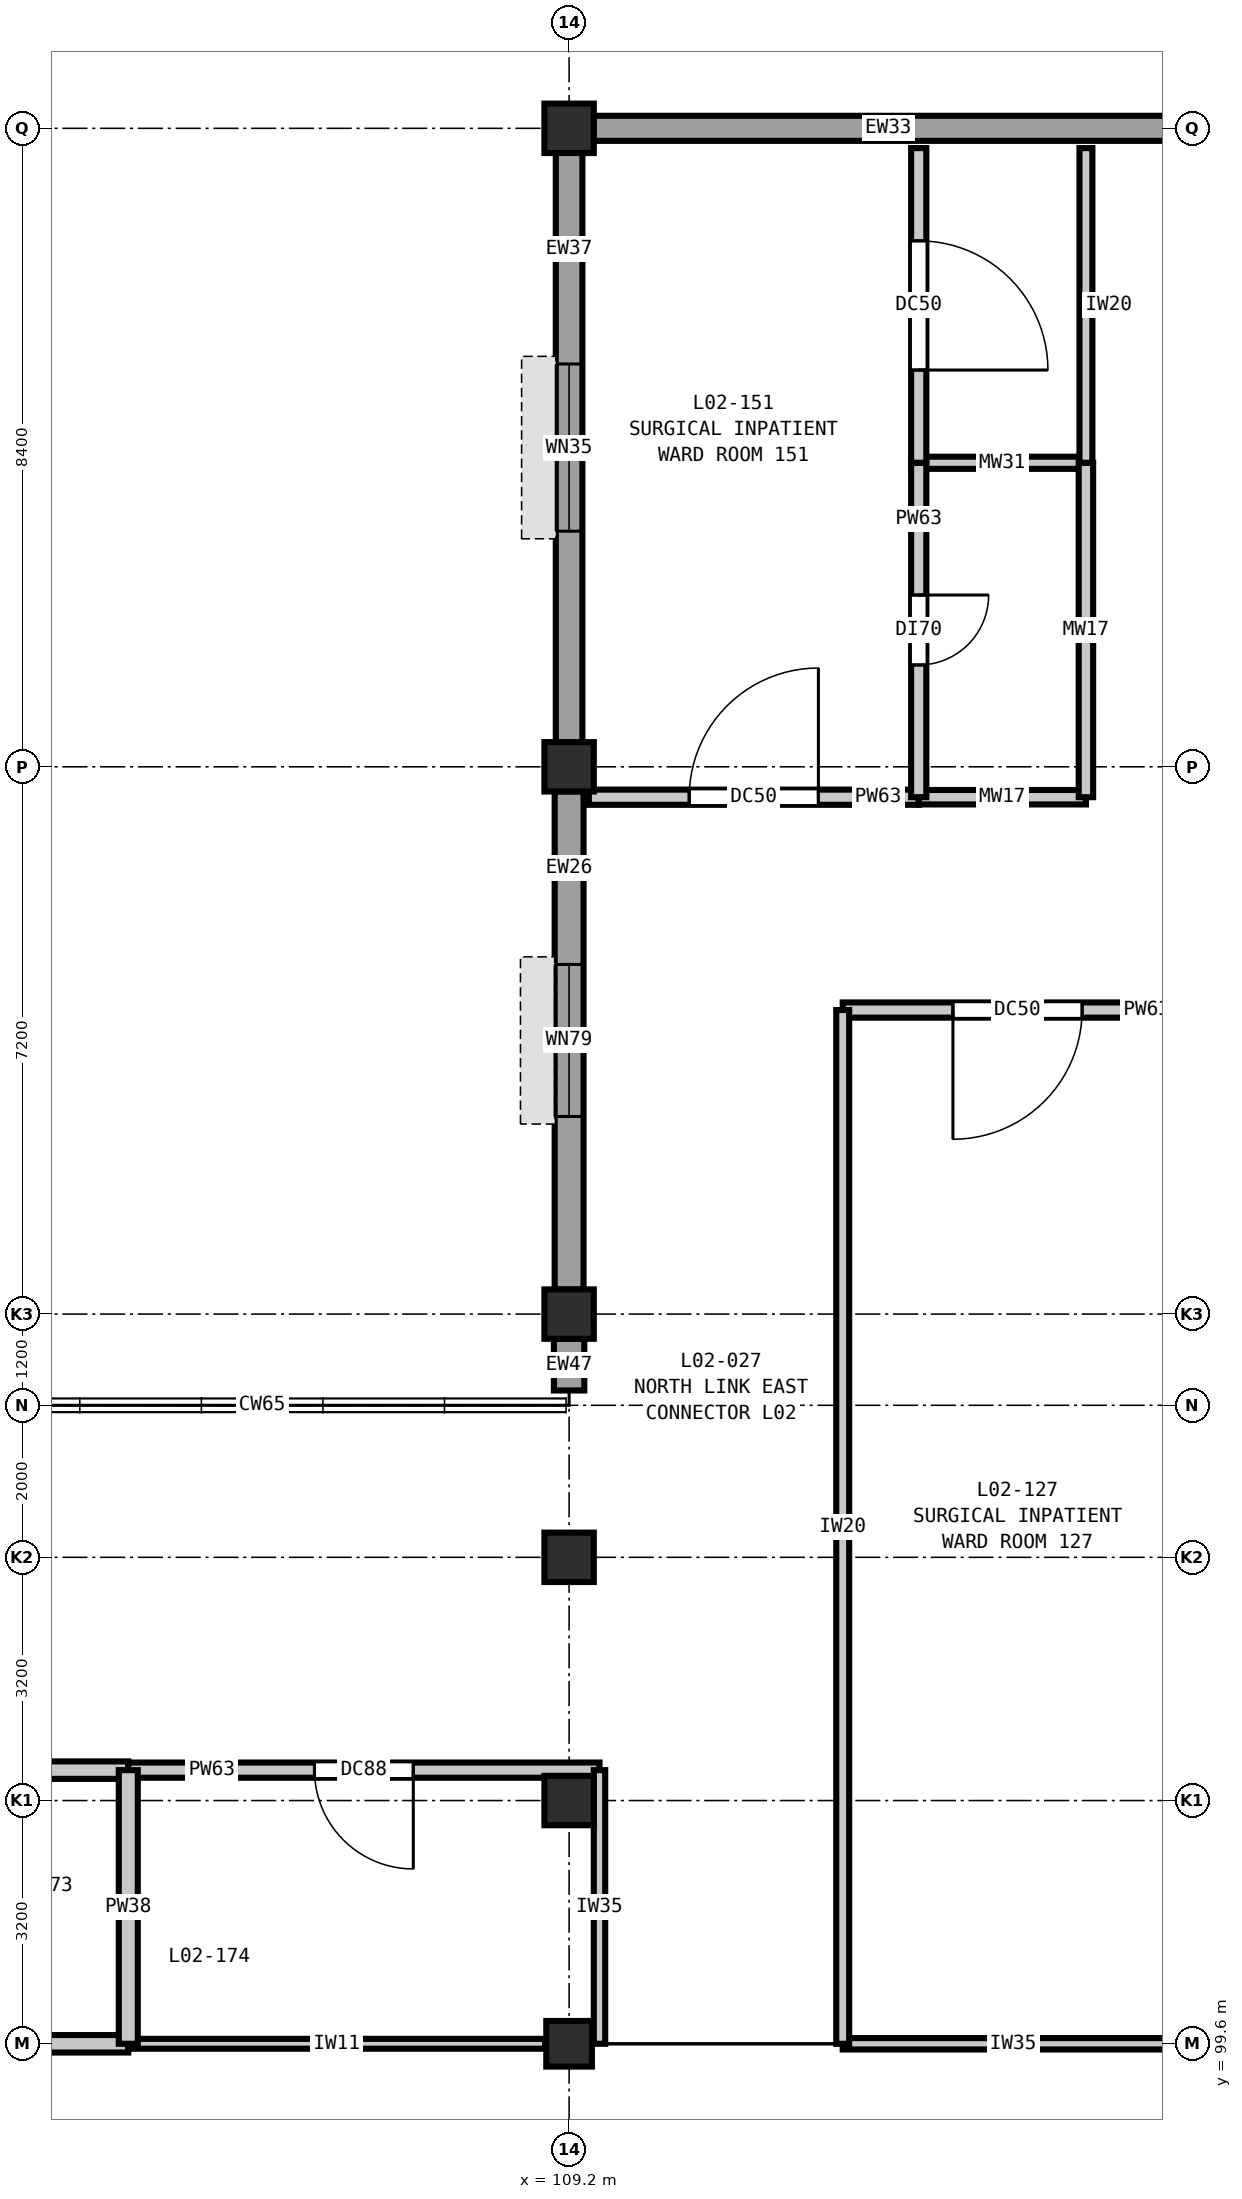
"""IFC4 building model, lengths in metres.
Left out: names, types, materials, properties, quantities, classifications, styles, units other than length and angle.
Written with IfcOpenShell. Run it as: python <this file> out.ifc"""

import sys

from ifc_helpers import new_model, si_unit, direction, frame, frame_2d, origin, origin_2d, place, context, subcontext, project, spatial, rectangle, extrude, element, fill, save


model = new_model("IFC4")
c1 = context("Model", 3, precision=1e-05, world=origin(), true_north=direction((0.0, 1.0)))
c2 = subcontext(c1, "Body", "Model", "MODEL_VIEW")
j1 = project(units=[si_unit("LENGTHUNIT", "METRE"), si_unit("PLANEANGLEUNIT", "RADIAN")], contexts=[c1])
p1 = place(None, origin())
s1 = spatial("IfcSite", under=j1, at=p1, CompositionType="ELEMENT")
p2 = place(p1, origin())
s2 = spatial("IfcBuilding", under=s1, at=p2, CompositionType="ELEMENT")
p3 = place(p2, frame((0.0, 0.0, 10.8)))
s3 = spatial("IfcBuildingStorey", under=s2, at=p3, CompositionType="ELEMENT", Elevation=10.8)
p4 = place(p3, frame((109.2, 99.6, 0.0), z_axis=(0.0, 0.0, 1.0), x_axis=(1.0, 0.0, 0.0)))
e1 = element("IfcColumn", 1, at=p4, inside=s3, PredefinedType="COLUMN", context=c2, shape_type="SweptSolid", body=[
    extrude(rectangle(XDim=0.6, YDim=0.6, at=origin_2d()), origin(), (0.0, 0.0, 1.0), 5.4),
])
for number, where, z_axis, x_axis in (
    (2, (109.2, 102.8, 0.0), (0.0, 0.0, 1.0), (1.0, 0.0, 0.0)),
    (3, (109.2, 106.0, 0.0), (0.0, 0.0, 1.0), (1.0, 0.0, 0.0)),
    (4, (109.2, 109.2, 0.0), (0.0, 0.0, 1.0), (1.0, 0.0, 0.0)),
    (5, (109.2, 116.4, 0.0), (0.0, 0.0, 1.0), (1.0, 0.0, 0.0)),
    (6, (109.2, 124.8, 0.0), (0.0, 0.0, 1.0), (1.0, 0.0, 0.0)),
):
    element("IfcColumn", number, at=place(p3, frame(where, z_axis=z_axis, x_axis=x_axis)), inside=s3, PredefinedType="COLUMN", context=c2, shape_type="SweptSolid", body=[
        extrude(rectangle(XDim=0.65, YDim=0.65, at=origin_2d()), origin(), (0.0, 0.0, 1.0), 5.4),
    ])
p5 = place(p3, frame((109.2, 108.195, 0.0), z_axis=(0.0, 0.0, 1.0), x_axis=(0.0, 1.0, 0.0)))
e7 = element("IfcWall", 7, at=p5, inside=s3, PredefinedType="SOLIDWALL", context=c2, shape_type="SweptSolid", body=[
    extrude(rectangle(XDim=0.682, YDim=0.4, at=frame_2d((0.341, 0.0))), origin(), (0.0, 0.0, 1.0), 4.68),
])
p6 = place(p3, frame((109.2, 109.523, 0.0), z_axis=(0.0, 0.0, 1.0), x_axis=(0.0, 1.0, 0.0)))
e8 = element("IfcWall", 8, at=p6, inside=s3, PredefinedType="SOLIDWALL", context=c2, shape_type="SweptSolid", body=[
    extrude(rectangle(XDim=6.554, YDim=0.38, at=frame_2d((3.277, 0.0))), origin(), (0.0, 0.0, 1.0), 4.68),
])
p7 = place(p6, frame((2.277, 0.0, 0.9)))
e9 = element("IfcOpeningElement", 9, at=p7, cuts=e8, PredefinedType="OPENING", context=c2, shape_type="SweptSolid", body=[
    extrude(rectangle(XDim=2.0, YDim=1.95, at=frame_2d((1.0, 0.975))), frame((0.0, 0.2, 0.0), z_axis=(0.0, -1.0, 0.0), x_axis=(1.0, 0.0, 0.0)), (0.0, 0.0, 1.0), 0.4),
])
p8 = place(p3, frame((109.2, 116.723, 0.0), z_axis=(0.0, 0.0, 1.0), x_axis=(0.0, 1.0, 0.0)))
e10 = element("IfcWall", 10, at=p8, inside=s3, PredefinedType="SOLIDWALL", context=c2, shape_type="SweptSolid", body=[
    extrude(rectangle(XDim=7.754, YDim=0.35, at=frame_2d((3.877, 0.0))), origin(), (0.0, 0.0, 1.0), 4.68),
])
p9 = place(p8, frame((2.777, 0.0, 0.9)))
e11 = element("IfcOpeningElement", 11, at=p9, cuts=e10, PredefinedType="OPENING", context=c2, shape_type="SweptSolid", body=[
    extrude(rectangle(XDim=2.2, YDim=1.95, at=frame_2d((1.1, 0.975))), frame((0.0, 0.185, 0.0), z_axis=(0.0, -1.0, 0.0), x_axis=(1.0, 0.0, 0.0)), (0.0, 0.0, 1.0), 0.37),
])
p10 = place(p3, frame((109.523, 124.8, 0.0), z_axis=(0.0, 0.0, 1.0), x_axis=(1.0, 0.0, 0.0)))
e12 = element("IfcWall", 12, at=p10, inside=s3, PredefinedType="SOLIDWALL", context=c2, shape_type="SweptSolid", body=[
    extrude(rectangle(XDim=7.754, YDim=0.33, at=frame_2d((3.877, 0.0))), origin(), (0.0, 0.0, 1.0), 4.68),
])
p11 = place(p3, frame((101.115, 99.6, 0.0), z_axis=(0.0, 0.0, 1.0), x_axis=(1.0, 0.0, 0.0)))
e13 = element("IfcWall", 13, at=p11, inside=s3, PredefinedType="PARTITIONING", context=c2, shape_type="SweptSolid", body=[
    extrude(rectangle(XDim=2.285, YDim=0.23, at=frame_2d((1.143, 0.0))), origin(), (0.0, 0.0, 1.0), 4.735),
])
p12 = place(p3, frame((103.4, 99.6, 0.0), z_axis=(0.0, 0.0, 1.0), x_axis=(1.0, 0.0, 0.0)))
e14 = element("IfcWall", 14, at=p12, inside=s3, PredefinedType="PARTITIONING", context=c2, shape_type="SweptSolid", body=[
    extrude(rectangle(XDim=5.485, YDim=0.13, at=frame_2d((2.743, 0.0))), origin(), (0.0, 0.0, 1.0), 4.735),
])
p13 = place(p3, frame((112.8, 99.6, 0.0), z_axis=(0.0, 0.0, 1.0), x_axis=(1.0, 0.0, 0.0)))
e15 = element("IfcWall", 15, at=p13, inside=s3, PredefinedType="PARTITIONING", context=c2, shape_type="SweptSolid", body=[
    extrude(rectangle(XDim=4.485, YDim=0.15, at=frame_2d((2.242, 0.0))), origin(), (0.0, 0.0, 1.0), 4.735),
])
p14 = place(p3, frame((98.0, 103.2, 0.0), z_axis=(0.0, 0.0, 1.0), x_axis=(1.0, 0.0, 0.0)))
e16 = element("IfcWall", 16, at=p14, inside=s3, PredefinedType="PARTITIONING", context=c2, shape_type="SweptSolid", body=[
    extrude(rectangle(XDim=5.4, YDim=0.23, at=frame_2d((2.7, 0.0))), origin(), (0.0, 0.0, 1.0), 5.07),
])
p15 = place(p14, frame((0.974, 0.0, 0.0)))
e17 = element("IfcOpeningElement", 17, at=p15, cuts=e16, PredefinedType="OPENING", context=c2, shape_type="SweptSolid", body=[
    extrude(rectangle(XDim=1.25, YDim=2.15, at=frame_2d((0.625, 1.075))), frame((0.0, 0.125, 0.0), z_axis=(0.0, -1.0, 0.0), x_axis=(1.0, 0.0, 0.0)), (0.0, 0.0, 1.0), 0.25),
])
p16 = place(p3, frame((103.4, 103.2, 0.0), z_axis=(0.0, 0.0, 1.0), x_axis=(1.0, 0.0, 0.0)))
e18 = element("IfcWall", 18, at=p16, inside=s3, PredefinedType="PARTITIONING", context=c2, shape_type="SweptSolid", body=[
    extrude(rectangle(XDim=6.2, YDim=0.2, at=frame_2d((3.1, 0.0))), origin(), (0.0, 0.0, 1.0), 5.07),
])
p17 = place(p16, frame((2.45, 0.0, 0.0)))
e19 = element("IfcOpeningElement", 19, at=p17, cuts=e18, PredefinedType="OPENING", context=c2, shape_type="SweptSolid", body=[
    extrude(rectangle(XDim=1.3, YDim=2.2, at=frame_2d((0.65, 1.1))), frame((0.0, 0.11, 0.0), z_axis=(0.0, -1.0, 0.0), x_axis=(1.0, 0.0, 0.0)), (0.0, 0.0, 1.0), 0.22),
])
p18 = place(p3, frame((112.8, 113.2, 0.0), z_axis=(0.0, 0.0, 1.0), x_axis=(1.0, 0.0, 0.0)))
e20 = element("IfcWall", 20, at=p18, inside=s3, PredefinedType="PARTITIONING", context=c2, shape_type="SweptSolid", body=[
    extrude(rectangle(XDim=4.6, YDim=0.2, at=frame_2d((2.3, 0.0))), origin(), (0.0, 0.0, 1.0), 5.07),
])
p19 = place(p18, frame((1.45, 0.0, 0.0)))
e21 = element("IfcOpeningElement", 21, at=p19, cuts=e20, PredefinedType="OPENING", context=c2, shape_type="SweptSolid", body=[
    extrude(rectangle(XDim=1.7, YDim=2.3, at=frame_2d((0.85, 1.15))), frame((0.0, 0.11, 0.0), z_axis=(0.0, -1.0, 0.0), x_axis=(1.0, 0.0, 0.0)), (0.0, 0.0, 1.0), 0.22),
])
p20 = place(p3, frame((109.46, 116.0, 0.0), z_axis=(0.0, 0.0, 1.0), x_axis=(1.0, 0.0, 0.0)))
e22 = element("IfcWall", 22, at=p20, inside=s3, PredefinedType="PARTITIONING", context=c2, shape_type="SweptSolid", body=[
    extrude(rectangle(XDim=4.34, YDim=0.2, at=frame_2d((2.17, 0.0))), origin(), (0.0, 0.0, 1.0), 5.07),
])
p21 = place(p20, frame((1.32, 0.0, 0.0)))
e23 = element("IfcOpeningElement", 23, at=p21, cuts=e22, PredefinedType="OPENING", context=c2, shape_type="SweptSolid", body=[
    extrude(rectangle(XDim=1.7, YDim=2.3, at=frame_2d((0.85, 1.15))), frame((0.0, 0.11, 0.0), z_axis=(0.0, -1.0, 0.0), x_axis=(1.0, 0.0, 0.0)), (0.0, 0.0, 1.0), 0.22),
])
p22 = place(p3, frame((113.8, 116.0, 0.0), z_axis=(0.0, 0.0, 1.0), x_axis=(1.0, 0.0, 0.0)))
e24 = element("IfcWall", 24, at=p22, inside=s3, PredefinedType="PLUMBINGWALL", context=c2, shape_type="SweptSolid", body=[
    extrude(rectangle(XDim=2.2, YDim=0.19, at=frame_2d((1.1, 0.0))), origin(), (0.0, 0.0, 1.0), 5.07),
])
p23 = place(p3, frame((113.8, 120.4, 0.0), z_axis=(0.0, 0.0, 1.0), x_axis=(1.0, 0.0, 0.0)))
e25 = element("IfcWall", 25, at=p23, inside=s3, PredefinedType="PLUMBINGWALL", context=c2, shape_type="SweptSolid", body=[
    extrude(rectangle(XDim=2.2, YDim=0.16, at=frame_2d((1.1, 0.0))), origin(), (0.0, 0.0, 1.0), 5.07),
])
p24 = place(p3, frame((103.4, 99.6, 0.0), z_axis=(0.0, 0.0, 1.0), x_axis=(0.0, 1.0, 0.0)))
e26 = element("IfcWall", 26, at=p24, inside=s3, PredefinedType="PARTITIONING", context=c2, shape_type="SweptSolid", body=[
    extrude(rectangle(XDim=3.6, YDim=0.25, at=frame_2d((1.8, 0.0))), origin(), (0.0, 0.0, 1.0), 5.07),
])
p25 = place(p3, frame((109.6, 99.6, 0.0), z_axis=(0.0, 0.0, 1.0), x_axis=(0.0, 1.0, 0.0)))
e27 = element("IfcWall", 27, at=p25, inside=s3, PredefinedType="PARTITIONING", context=c2, shape_type="SweptSolid", body=[
    extrude(rectangle(XDim=3.6, YDim=0.15, at=frame_2d((1.8, 0.0))), origin(), (0.0, 0.0, 1.0), 5.07),
])
p26 = place(p3, frame((112.8, 99.6, 0.0), z_axis=(0.0, 0.0, 1.0), x_axis=(0.0, 1.0, 0.0)))
e28 = element("IfcWall", 28, at=p26, inside=s3, PredefinedType="PARTITIONING", context=c2, shape_type="SweptSolid", body=[
    extrude(rectangle(XDim=13.6, YDim=0.17, at=frame_2d((6.8, 0.0))), origin(), (0.0, 0.0, 1.0), 5.07),
])
p27 = place(p3, frame((113.8, 116.0, 0.0), z_axis=(0.0, 0.0, 1.0), x_axis=(0.0, 1.0, 0.0)))
e29 = element("IfcWall", 29, at=p27, inside=s3, PredefinedType="PARTITIONING", context=c2, shape_type="SweptSolid", body=[
    extrude(rectangle(XDim=4.4, YDim=0.2, at=frame_2d((2.2, 0.0))), origin(), (0.0, 0.0, 1.0), 5.07),
])
p28 = place(p27, frame((1.74, 0.0, 0.0)))
e30 = element("IfcOpeningElement", 30, at=p28, cuts=e29, PredefinedType="OPENING", context=c2, shape_type="SweptSolid", body=[
    extrude(rectangle(XDim=0.92, YDim=2.1, at=frame_2d((0.46, 1.05))), frame((0.0, 0.11, 0.0), z_axis=(0.0, -1.0, 0.0), x_axis=(1.0, 0.0, 0.0)), (0.0, 0.0, 1.0), 0.22),
])
p29 = place(p3, frame((113.8, 120.4, 0.0), z_axis=(0.0, 0.0, 1.0), x_axis=(0.0, 1.0, 0.0)))
e31 = element("IfcWall", 31, at=p29, inside=s3, PredefinedType="PARTITIONING", context=c2, shape_type="SweptSolid", body=[
    extrude(rectangle(XDim=4.14, YDim=0.2, at=frame_2d((2.07, 0.0))), origin(), (0.0, 0.0, 1.0), 5.07),
])
p30 = place(p29, frame((1.22, 0.0, 0.0)))
e32 = element("IfcOpeningElement", 32, at=p30, cuts=e31, PredefinedType="OPENING", context=c2, shape_type="SweptSolid", body=[
    extrude(rectangle(XDim=1.7, YDim=2.3, at=frame_2d((0.85, 1.15))), frame((0.0, 0.11, 0.0), z_axis=(0.0, -1.0, 0.0), x_axis=(1.0, 0.0, 0.0)), (0.0, 0.0, 1.0), 0.22),
])
p31 = place(p3, frame((116.0, 116.0, 0.0), z_axis=(0.0, 0.0, 1.0), x_axis=(0.0, 1.0, 0.0)))
e33 = element("IfcWall", 33, at=p31, inside=s3, PredefinedType="PLUMBINGWALL", context=c2, shape_type="SweptSolid", body=[
    extrude(rectangle(XDim=4.4, YDim=0.19, at=frame_2d((2.2, 0.0))), origin(), (0.0, 0.0, 1.0), 5.07),
])
p32 = place(p3, frame((116.0, 120.4, 0.0), z_axis=(0.0, 0.0, 1.0), x_axis=(0.0, 1.0, 0.0)))
e34 = element("IfcWall", 34, at=p32, inside=s3, PredefinedType="PARTITIONING", context=c2, shape_type="SweptSolid", body=[
    extrude(rectangle(XDim=4.14, YDim=0.17, at=frame_2d((2.07, 0.0))), origin(), (0.0, 0.0, 1.0), 5.07),
])
p33 = place(p7, origin())
e35 = element("IfcWindow", 35, at=p33, inside=s3, PartitioningType="DOUBLE_PANEL_VERTICAL", PredefinedType="WINDOW", context=c2, shape_type="SweptSolid", body=[
    extrude(rectangle(XDim=2.0, YDim=1.95, at=frame_2d((1.0, 0.975))), frame((0.0, 0.03, 0.0), z_axis=(0.0, -1.0, 0.0), x_axis=(1.0, 0.0, 0.0)), (0.0, 0.0, 1.0), 0.06),
])
fill(e9, e35)
p34 = place(p9, origin())
e36 = element("IfcWindow", 36, at=p34, inside=s3, PartitioningType="DOUBLE_PANEL_VERTICAL", PredefinedType="WINDOW", context=c2, shape_type="SweptSolid", body=[
    extrude(rectangle(XDim=2.2, YDim=1.95, at=frame_2d((1.1, 0.975))), frame((0.0, 0.03, 0.0), z_axis=(0.0, -1.0, 0.0), x_axis=(1.0, 0.0, 0.0)), (0.0, 0.0, 1.0), 0.06),
])
fill(e11, e36)
p35 = place(p17, frame((1.3, 0.0, 0.0), z_axis=(0.0, 0.0, 1.0), x_axis=(-1.0, 0.0, 0.0)))
e37 = element("IfcDoor", 37, at=p35, inside=s3, OperationType="SINGLE_SWING_LEFT", PredefinedType="DOOR", context=c2, shape_type="SweptSolid", body=[
    extrude(rectangle(XDim=1.3, YDim=2.2, at=frame_2d((0.65, 1.1))), frame((0.0, 0.025, 0.0), z_axis=(0.0, -1.0, 0.0), x_axis=(1.0, 0.0, 0.0)), (0.0, 0.0, 1.0), 0.05),
])
fill(e19, e37)
p36 = place(p19, frame((1.7, 0.0, 0.0), z_axis=(0.0, 0.0, 1.0), x_axis=(-1.0, 0.0, 0.0)))
e38 = element("IfcDoor", 38, at=p36, inside=s3, OperationType="SINGLE_SWING_RIGHT", PredefinedType="DOOR", context=c2, shape_type="SweptSolid", body=[
    extrude(rectangle(XDim=1.7, YDim=2.3, at=frame_2d((0.85, 1.15))), frame((0.0, 0.025, 0.0), z_axis=(0.0, -1.0, 0.0), x_axis=(1.0, 0.0, 0.0)), (0.0, 0.0, 1.0), 0.05),
])
fill(e21, e38)
p37 = place(p21, origin())
e39 = element("IfcDoor", 39, at=p37, inside=s3, OperationType="SINGLE_SWING_RIGHT", PredefinedType="DOOR", context=c2, shape_type="SweptSolid", body=[
    extrude(rectangle(XDim=1.7, YDim=2.3, at=frame_2d((0.85, 1.15))), frame((0.0, 0.025, 0.0), z_axis=(0.0, -1.0, 0.0), x_axis=(1.0, 0.0, 0.0)), (0.0, 0.0, 1.0), 0.05),
])
fill(e23, e39)
p38 = place(p28, frame((0.92, 0.0, 0.0), z_axis=(0.0, 0.0, 1.0), x_axis=(-1.0, 0.0, 0.0)))
e40 = element("IfcDoor", 40, at=p38, inside=s3, OperationType="SINGLE_SWING_LEFT", PredefinedType="DOOR", context=c2, shape_type="SweptSolid", body=[
    extrude(rectangle(XDim=0.92, YDim=2.1, at=frame_2d((0.46, 1.05))), frame((0.0, 0.025, 0.0), z_axis=(0.0, -1.0, 0.0), x_axis=(1.0, 0.0, 0.0)), (0.0, 0.0, 1.0), 0.05),
])
fill(e30, e40)
p39 = place(p30, frame((1.7, 0.0, 0.0), z_axis=(0.0, 0.0, 1.0), x_axis=(-1.0, 0.0, 0.0)))
e41 = element("IfcDoor", 41, at=p39, inside=s3, OperationType="SINGLE_SWING_RIGHT", PredefinedType="DOOR", context=c2, shape_type="SweptSolid", body=[
    extrude(rectangle(XDim=1.7, YDim=2.3, at=frame_2d((0.85, 1.15))), frame((0.0, 0.025, 0.0), z_axis=(0.0, -1.0, 0.0), x_axis=(1.0, 0.0, 0.0)), (0.0, 0.0, 1.0), 0.05),
])
fill(e32, e41)
save(model, sys.argv[1])
